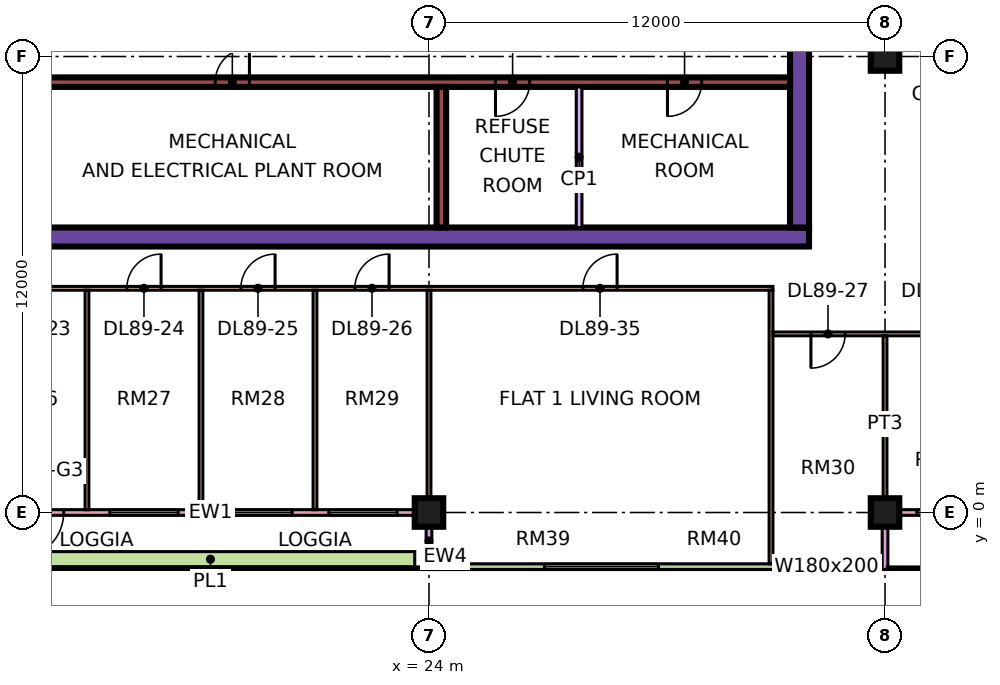
"""IFC4 building model, lengths in metres.
Left out: names, types, materials, properties, quantities, classifications, styles, units other than length and angle.
Written with IfcOpenShell. Run it as: python <this file> out.ifc"""

import sys

from ifc_helpers import new_model, si_unit, direction, frame, frame_2d, origin, origin_2d, place, context, subcontext, project, spatial, rectangle, extrude, element, fill, save


model = new_model("IFC4")
c1 = context("Model", 3, precision=1e-05, world=origin(), true_north=direction((0.0, 1.0)))
c2 = subcontext(c1, "Body", "Model", "MODEL_VIEW")
j1 = project(units=[si_unit("LENGTHUNIT", "METRE"), si_unit("PLANEANGLEUNIT", "RADIAN")], contexts=[c1])
p1 = place(None, origin())
s1 = spatial("IfcSite", under=j1, at=p1, CompositionType="ELEMENT")
p2 = place(p1, origin())
s2 = spatial("IfcBuilding", under=s1, at=p2, CompositionType="ELEMENT")
p3 = place(p2, frame((0.0, 0.0, 380.15)))
s3 = spatial("IfcBuildingStorey", under=s2, at=p3, CompositionType="ELEMENT", Elevation=380.15)
for number, where, z_axis, x_axis in (
    (1, (24.0, 0.0, 0.0), (0.0, 0.0, 1.0), (1.0, 0.0, 0.0)),
    (2, (36.0, 0.0, 0.0), (0.0, 0.0, 1.0), (1.0, 0.0, 0.0)),
    (3, (36.0, 12.0, 0.0), (0.0, 0.0, 1.0), (1.0, 0.0, 0.0)),
):
    element("IfcColumn", number, at=place(p3, frame(where, z_axis=z_axis, x_axis=x_axis)), inside=s3, PredefinedType="COLUMN", context=c2, shape_type="SweptSolid", body=[
        extrude(rectangle(XDim=0.75, YDim=0.75, at=origin_2d()), origin(), (0.0, 0.0, 1.0), 3.75),
    ])
p4 = place(p3, frame((9.0, 7.25, 0.0), z_axis=(0.0, 0.0, 1.0), x_axis=(1.0, 0.0, 0.0)))
e4 = element("IfcWall", 4, at=p4, inside=s3, PredefinedType="SHEAR", context=c2, shape_type="SweptSolid", body=[
    extrude(rectangle(XDim=25.0, YDim=0.5, at=frame_2d((12.5, 0.0))), origin(), (0.0, 0.0, 1.0), 3.75),
])
p5 = place(p3, frame((33.75, 7.5, 0.0), z_axis=(0.0, 0.0, 1.0), x_axis=(0.0, 1.0, 0.0)))
e5 = element("IfcWall", 5, at=p5, inside=s3, PredefinedType="SHEAR", context=c2, shape_type="SweptSolid", body=[
    extrude(rectangle(XDim=12.0, YDim=0.5, at=frame_2d((6.0, 0.0))), origin(), (0.0, 0.0, 1.0), 3.75),
])
p6 = place(p5, frame((5.7, 0.0, 0.0)))
e6 = element("IfcOpeningElement", 6, at=p6, cuts=e5, PredefinedType="OPENING", context=c2, shape_type="SweptSolid", body=[
    extrude(rectangle(XDim=1.8, YDim=2.4, at=frame_2d((0.9, 1.2))), frame((0.0, 0.26, 0.0), z_axis=(0.0, -1.0, 0.0), x_axis=(1.0, 0.0, 0.0)), (0.0, 0.0, 1.0), 0.52),
])
p7 = place(p3, frame((13.45, 11.325, 0.0), z_axis=(0.0, 0.0, 1.0), x_axis=(1.0, 0.0, 0.0)))
e7 = element("IfcWall", 7, at=p7, inside=s3, PredefinedType="SHEAR", context=c2, shape_type="SweptSolid", body=[
    extrude(rectangle(XDim=20.05, YDim=0.25, at=frame_2d((10.025, 0.0))), origin(), (0.0, 0.0, 1.0), 3.75),
])
p8 = place(p7, frame((4.925, 0.0, 0.0)))
e8 = element("IfcOpeningElement", 8, at=p8, cuts=e7, PredefinedType="OPENING", context=c2, shape_type="SweptSolid", body=[
    extrude(rectangle(XDim=0.9, YDim=2.1, at=frame_2d((0.45, 1.05))), frame((0.0, 0.135, 0.0), z_axis=(0.0, -1.0, 0.0), x_axis=(1.0, 0.0, 0.0)), (0.0, 0.0, 1.0), 0.27),
])
p9 = place(p7, frame((12.3, 0.0, 0.0)))
e9 = element("IfcOpeningElement", 9, at=p9, cuts=e7, PredefinedType="OPENING", context=c2, shape_type="SweptSolid", body=[
    extrude(rectangle(XDim=0.9, YDim=2.1, at=frame_2d((0.45, 1.05))), frame((0.0, 0.135, 0.0), z_axis=(0.0, -1.0, 0.0), x_axis=(1.0, 0.0, 0.0)), (0.0, 0.0, 1.0), 0.27),
])
p10 = place(p7, frame((16.825, 0.0, 0.0)))
e10 = element("IfcOpeningElement", 10, at=p10, cuts=e7, PredefinedType="OPENING", context=c2, shape_type="SweptSolid", body=[
    extrude(rectangle(XDim=0.9, YDim=2.1, at=frame_2d((0.45, 1.05))), frame((0.0, 0.135, 0.0), z_axis=(0.0, -1.0, 0.0), x_axis=(1.0, 0.0, 0.0)), (0.0, 0.0, 1.0), 0.27),
])
p11 = place(p3, frame((24.325, 7.5, 0.0), z_axis=(0.0, 0.0, 1.0), x_axis=(0.0, 1.0, 0.0)))
e11 = element("IfcWall", 11, at=p11, inside=s3, PredefinedType="SHEAR", context=c2, shape_type="SweptSolid", body=[
    extrude(rectangle(XDim=3.7, YDim=0.25, at=frame_2d((1.85, 0.0))), origin(), (0.0, 0.0, 1.0), 3.75),
])
p12 = place(p3, frame((12.575, 0.0, 0.0), z_axis=(0.0, 0.0, 1.0), x_axis=(1.0, 0.0, 0.0)))
e12 = element("IfcWall", 12, at=p12, inside=s3, PredefinedType="SOLIDWALL", context=c2, shape_type="SweptSolid", body=[
    extrude(rectangle(XDim=11.35, YDim=0.15, at=frame_2d((5.675, 0.0))), origin(), (0.0, 0.0, 1.0), 3.3),
])
p13 = place(p12, frame((0.613, 0.0, 0.0)))
e13 = element("IfcOpeningElement", 13, at=p13, cuts=e12, PredefinedType="OPENING", context=c2, shape_type="SweptSolid", body=[
    extrude(rectangle(XDim=1.2, YDim=2.4, at=frame_2d((0.6, 1.2))), frame((0.0, 0.085, 0.0), z_axis=(0.0, -1.0, 0.0), x_axis=(1.0, 0.0, 0.0)), (0.0, 0.0, 1.0), 0.17),
])
p14 = place(p12, frame((3.025, 0.0, 0.45)))
e14 = element("IfcOpeningElement", 14, at=p14, cuts=e12, PredefinedType="OPENING", context=c2, shape_type="SweptSolid", body=[
    extrude(rectangle(XDim=1.8, YDim=2.0, at=frame_2d((0.9, 1.0))), frame((0.0, 0.085, 0.0), z_axis=(0.0, -1.0, 0.0), x_axis=(1.0, 0.0, 0.0)), (0.0, 0.0, 1.0), 0.17),
])
p15 = place(p12, frame((6.025, 0.0, 0.45)))
e15 = element("IfcOpeningElement", 15, at=p15, cuts=e12, PredefinedType="OPENING", context=c2, shape_type="SweptSolid", body=[
    extrude(rectangle(XDim=1.8, YDim=2.0, at=frame_2d((0.9, 1.0))), frame((0.0, 0.085, 0.0), z_axis=(0.0, -1.0, 0.0), x_axis=(1.0, 0.0, 0.0)), (0.0, 0.0, 1.0), 0.17),
])
p16 = place(p12, frame((8.788, 0.0, 0.45)))
e16 = element("IfcOpeningElement", 16, at=p16, cuts=e12, PredefinedType="OPENING", context=c2, shape_type="SweptSolid", body=[
    extrude(rectangle(XDim=1.8, YDim=2.0, at=frame_2d((0.9, 1.0))), frame((0.0, 0.085, 0.0), z_axis=(0.0, -1.0, 0.0), x_axis=(1.0, 0.0, 0.0)), (0.0, 0.0, 1.0), 0.17),
])
p17 = place(p3, frame((24.0, -1.5, 0.0), z_axis=(0.0, 0.0, 1.0), x_axis=(0.0, 1.0, 0.0)))
e17 = element("IfcWall", 17, at=p17, inside=s3, PredefinedType="SOLIDWALL", context=c2, shape_type="SweptSolid", body=[
    extrude(rectangle(XDim=1.5, YDim=0.15, at=frame_2d((0.75, 0.0))), origin(), (0.0, 0.0, 1.0), 3.3),
])
p18 = place(p3, frame((24.075, -1.425, 0.0), z_axis=(0.0, 0.0, 1.0), x_axis=(1.0, 0.0, 0.0)))
e18 = element("IfcWall", 18, at=p18, inside=s3, PredefinedType="SOLIDWALL", context=c2, shape_type="SweptSolid", body=[
    extrude(rectangle(XDim=11.85, YDim=0.15, at=frame_2d((5.925, 0.0))), origin(), (0.0, 0.0, 1.0), 3.3),
])
p19 = place(p18, frame((2.962, 0.0, 0.45)))
e19 = element("IfcOpeningElement", 19, at=p19, cuts=e18, PredefinedType="OPENING", context=c2, shape_type="SweptSolid", body=[
    extrude(rectangle(XDim=3.0, YDim=2.0, at=frame_2d((1.5, 1.0))), frame((0.0, 0.085, 0.0), z_axis=(0.0, -1.0, 0.0), x_axis=(1.0, 0.0, 0.0)), (0.0, 0.0, 1.0), 0.17),
])
p20 = place(p18, frame((9.488, 0.0, 0.45)))
e20 = element("IfcOpeningElement", 20, at=p20, cuts=e18, PredefinedType="OPENING", context=c2, shape_type="SweptSolid", body=[
    extrude(rectangle(XDim=1.8, YDim=2.0, at=frame_2d((0.9, 1.0))), frame((0.0, 0.085, 0.0), z_axis=(0.0, -1.0, 0.0), x_axis=(1.0, 0.0, 0.0)), (0.0, 0.0, 1.0), 0.17),
])
p21 = place(p3, frame((36.075, 0.0, 0.0), z_axis=(0.0, 0.0, 1.0), x_axis=(1.0, 0.0, 0.0)))
e21 = element("IfcWall", 21, at=p21, inside=s3, PredefinedType="SOLIDWALL", context=c2, shape_type="SweptSolid", body=[
    extrude(rectangle(XDim=11.85, YDim=0.15, at=frame_2d((5.925, 0.0))), origin(), (0.0, 0.0, 1.0), 3.3),
])
p22 = place(p21, frame((0.762, 0.0, 0.45)))
e22 = element("IfcOpeningElement", 22, at=p22, cuts=e21, PredefinedType="OPENING", context=c2, shape_type="SweptSolid", body=[
    extrude(rectangle(XDim=1.8, YDim=2.0, at=frame_2d((0.9, 1.0))), frame((0.0, 0.085, 0.0), z_axis=(0.0, -1.0, 0.0), x_axis=(1.0, 0.0, 0.0)), (0.0, 0.0, 1.0), 0.17),
])
p23 = place(p21, frame((4.788, 0.0, 0.0)))
e23 = element("IfcOpeningElement", 23, at=p23, cuts=e21, PredefinedType="OPENING", context=c2, shape_type="SweptSolid", body=[
    extrude(rectangle(XDim=1.8, YDim=2.4, at=frame_2d((0.9, 1.2))), frame((0.0, 0.085, 0.0), z_axis=(0.0, -1.0, 0.0), x_axis=(1.0, 0.0, 0.0)), (0.0, 0.0, 1.0), 0.17),
])
p24 = place(p21, frame((10.025, 0.0, 0.45)))
e24 = element("IfcOpeningElement", 24, at=p24, cuts=e21, PredefinedType="OPENING", context=c2, shape_type="SweptSolid", body=[
    extrude(rectangle(XDim=1.2, YDim=2.0, at=frame_2d((0.6, 1.0))), frame((0.0, 0.085, 0.0), z_axis=(0.0, -1.0, 0.0), x_axis=(1.0, 0.0, 0.0)), (0.0, 0.0, 1.0), 0.17),
])
p25 = place(p3, frame((36.0, -1.5, 0.0), z_axis=(0.0, 0.0, 1.0), x_axis=(0.0, 1.0, 0.0)))
e25 = element("IfcWall", 25, at=p25, inside=s3, PredefinedType="SOLIDWALL", context=c2, shape_type="SweptSolid", body=[
    extrude(rectangle(XDim=1.5, YDim=0.15, at=frame_2d((0.75, 0.0))), origin(), (0.0, 0.0, 1.0), 3.3),
])
p26 = place(p3, frame((12.875, -1.229, 0.0), z_axis=(0.0, 0.0, 1.0), x_axis=(1.0, 0.0, 0.0)))
e26 = element("IfcWall", 26, at=p26, inside=s3, PredefinedType="SOLIDWALL", context=c2, shape_type="SweptSolid", body=[
    extrude(rectangle(XDim=10.75, YDim=0.4, at=frame_2d((5.375, 0.0))), origin(), (0.0, 0.0, 1.0), 0.7),
])
p27 = place(p3, frame((27.95, 7.5, 0.0), z_axis=(0.0, 0.0, 1.0), x_axis=(0.0, 1.0, 0.0)))
e27 = element("IfcWall", 27, at=p27, inside=s3, PredefinedType="PARTITIONING", context=c2, shape_type="SweptSolid", body=[
    extrude(rectangle(XDim=3.7, YDim=0.15, at=frame_2d((1.85, 0.0))), origin(), (0.0, 0.0, 1.0), 3.3),
])
p28 = place(p3, frame((11.95, 5.9, 0.0), z_axis=(0.0, 0.0, 1.0), x_axis=(1.0, 0.0, 0.0)))
e28 = element("IfcWall", 28, at=p28, inside=s3, PredefinedType="PARTITIONING", context=c2, shape_type="SweptSolid", body=[
    extrude(rectangle(XDim=21.1, YDim=0.1, at=frame_2d((10.55, 0.0))), origin(), (0.0, 0.0, 1.0), 3.3),
])
p29 = place(p28, frame((1.1, 0.0, 0.0)))
e29 = element("IfcOpeningElement", 29, at=p29, cuts=e28, PredefinedType="OPENING", context=c2, shape_type="SweptSolid", body=[
    extrude(rectangle(XDim=0.9, YDim=2.1, at=frame_2d((0.45, 1.05))), frame((0.0, 0.06, 0.0), z_axis=(0.0, -1.0, 0.0), x_axis=(1.0, 0.0, 0.0)), (0.0, 0.0, 1.0), 0.12),
])
p30 = place(p28, frame((4.1, 0.0, 0.0)))
e30 = element("IfcOpeningElement", 30, at=p30, cuts=e28, PredefinedType="OPENING", context=c2, shape_type="SweptSolid", body=[
    extrude(rectangle(XDim=0.9, YDim=2.1, at=frame_2d((0.45, 1.05))), frame((0.0, 0.06, 0.0), z_axis=(0.0, -1.0, 0.0), x_axis=(1.0, 0.0, 0.0)), (0.0, 0.0, 1.0), 0.12),
])
p31 = place(p28, frame((7.1, 0.0, 0.0)))
e31 = element("IfcOpeningElement", 31, at=p31, cuts=e28, PredefinedType="OPENING", context=c2, shape_type="SweptSolid", body=[
    extrude(rectangle(XDim=0.9, YDim=2.1, at=frame_2d((0.45, 1.05))), frame((0.0, 0.06, 0.0), z_axis=(0.0, -1.0, 0.0), x_axis=(1.0, 0.0, 0.0)), (0.0, 0.0, 1.0), 0.12),
])
p32 = place(p28, frame((10.1, 0.0, 0.0)))
e32 = element("IfcOpeningElement", 32, at=p32, cuts=e28, PredefinedType="OPENING", context=c2, shape_type="SweptSolid", body=[
    extrude(rectangle(XDim=0.9, YDim=2.1, at=frame_2d((0.45, 1.05))), frame((0.0, 0.06, 0.0), z_axis=(0.0, -1.0, 0.0), x_axis=(1.0, 0.0, 0.0)), (0.0, 0.0, 1.0), 0.12),
])
p33 = place(p28, frame((16.1, 0.0, 0.0)))
e33 = element("IfcOpeningElement", 33, at=p33, cuts=e28, PredefinedType="OPENING", context=c2, shape_type="SweptSolid", body=[
    extrude(rectangle(XDim=0.9, YDim=2.1, at=frame_2d((0.45, 1.05))), frame((0.0, 0.06, 0.0), z_axis=(0.0, -1.0, 0.0), x_axis=(1.0, 0.0, 0.0)), (0.0, 0.0, 1.0), 0.12),
])
for number, where, z_axis, x_axis in (
    (34, (15.0, 0.074, 0.0), (0.0, 0.0, 1.0), (0.0, 1.0, 0.0)),
    (35, (18.0, 0.074, 0.0), (0.0, 0.0, 1.0), (0.0, 1.0, 0.0)),
    (36, (21.0, 0.074, 0.0), (0.0, 0.0, 1.0), (0.0, 1.0, 0.0)),
):
    element("IfcWall", number, at=place(p3, frame(where, z_axis=z_axis, x_axis=x_axis)), inside=s3, PredefinedType="PARTITIONING", context=c2, shape_type="SweptSolid", body=[
        extrude(rectangle(XDim=5.776, YDim=0.1, at=frame_2d((2.888, 0.0))), origin(), (0.0, 0.0, 1.0), 3.3),
    ])
p34 = place(p3, frame((24.0, 0.0, 0.0), z_axis=(0.0, 0.0, 1.0), x_axis=(0.0, 1.0, 0.0)))
e37 = element("IfcWall", 37, at=p34, inside=s3, PredefinedType="PARTITIONING", context=c2, shape_type="SweptSolid", body=[
    extrude(rectangle(XDim=5.85, YDim=0.1, at=frame_2d((2.925, 0.0))), origin(), (0.0, 0.0, 1.0), 3.3),
])
p35 = place(p3, frame((33.0, -1.35, 0.0), z_axis=(0.0, 0.0, 1.0), x_axis=(0.0, 1.0, 0.0)))
e38 = element("IfcWall", 38, at=p35, inside=s3, PredefinedType="PARTITIONING", context=c2, shape_type="SweptSolid", body=[
    extrude(rectangle(XDim=7.2, YDim=0.1, at=frame_2d((3.6, 0.0))), origin(), (0.0, 0.0, 1.0), 3.3),
])
p36 = place(p3, frame((33.05, 4.7, 0.0), z_axis=(0.0, 0.0, 1.0), x_axis=(1.0, 0.0, 0.0)))
e39 = element("IfcWall", 39, at=p36, inside=s3, PredefinedType="PARTITIONING", context=c2, shape_type="SweptSolid", body=[
    extrude(rectangle(XDim=22.301, YDim=0.1, at=frame_2d((11.15, 0.0))), origin(), (0.0, 0.0, 1.0), 3.3),
])
p37 = place(p36, frame((1.0, 0.0, 0.0)))
e40 = element("IfcOpeningElement", 40, at=p37, cuts=e39, PredefinedType="OPENING", context=c2, shape_type="SweptSolid", body=[
    extrude(rectangle(XDim=0.9, YDim=2.1, at=frame_2d((0.45, 1.05))), frame((0.0, 0.06, 0.0), z_axis=(0.0, -1.0, 0.0), x_axis=(1.0, 0.0, 0.0)), (0.0, 0.0, 1.0), 0.12),
])
p38 = place(p36, frame((4.0, 0.0, 0.0)))
e41 = element("IfcOpeningElement", 41, at=p38, cuts=e39, PredefinedType="OPENING", context=c2, shape_type="SweptSolid", body=[
    extrude(rectangle(XDim=0.9, YDim=2.1, at=frame_2d((0.45, 1.05))), frame((0.0, 0.06, 0.0), z_axis=(0.0, -1.0, 0.0), x_axis=(1.0, 0.0, 0.0)), (0.0, 0.0, 1.0), 0.12),
])
p39 = place(p36, frame((16.0, 0.0, 0.0)))
e42 = element("IfcOpeningElement", 42, at=p39, cuts=e39, PredefinedType="OPENING", context=c2, shape_type="SweptSolid", body=[
    extrude(rectangle(XDim=0.9, YDim=2.1, at=frame_2d((0.45, 1.05))), frame((0.0, 0.06, 0.0), z_axis=(0.0, -1.0, 0.0), x_axis=(1.0, 0.0, 0.0)), (0.0, 0.0, 1.0), 0.12),
])
p40 = place(p36, frame((19.0, 0.0, 0.0)))
e43 = element("IfcOpeningElement", 43, at=p40, cuts=e39, PredefinedType="OPENING", context=c2, shape_type="SweptSolid", body=[
    extrude(rectangle(XDim=0.9, YDim=2.1, at=frame_2d((0.45, 1.05))), frame((0.0, 0.06, 0.0), z_axis=(0.0, -1.0, 0.0), x_axis=(1.0, 0.0, 0.0)), (0.0, 0.0, 1.0), 0.12),
])
p41 = place(p36, frame((10.0, 0.0, 0.0)))
e44 = element("IfcOpeningElement", 44, at=p41, cuts=e39, PredefinedType="OPENING", context=c2, shape_type="SweptSolid", body=[
    extrude(rectangle(XDim=0.9, YDim=2.1, at=frame_2d((0.45, 1.05))), frame((0.0, 0.06, 0.0), z_axis=(0.0, -1.0, 0.0), x_axis=(1.0, 0.0, 0.0)), (0.0, 0.0, 1.0), 0.12),
])
p42 = place(p3, frame((36.0, 0.0, 0.0), z_axis=(0.0, 0.0, 1.0), x_axis=(0.0, 1.0, 0.0)))
e45 = element("IfcWall", 45, at=p42, inside=s3, PredefinedType="PARTITIONING", context=c2, shape_type="SweptSolid", body=[
    extrude(rectangle(XDim=4.65, YDim=0.1, at=frame_2d((2.325, 0.0))), origin(), (0.0, 0.0, 1.0), 3.3),
])
p43 = place(p13, frame((1.2, 0.0, 0.0), z_axis=(0.0, 0.0, 1.0), x_axis=(-1.0, 0.0, 0.0)))
e46 = element("IfcDoor", 46, at=p43, inside=s3, OperationType="DOUBLE_DOOR_SINGLE_SWING", PredefinedType="DOOR", context=c2, shape_type="SweptSolid", body=[
    extrude(rectangle(XDim=1.2, YDim=2.4, at=frame_2d((0.6, 1.2))), frame((0.0, 0.025, 0.0), z_axis=(0.0, -1.0, 0.0), x_axis=(1.0, 0.0, 0.0)), (0.0, 0.0, 1.0), 0.05),
])
fill(e13, e46)
p44 = place(p14, origin())
e47 = element("IfcWindow", 47, at=p44, inside=s3, PartitioningType="SINGLE_PANEL", PredefinedType="WINDOW", context=c2, shape_type="SweptSolid", body=[
    extrude(rectangle(XDim=1.8, YDim=2.0, at=frame_2d((0.9, 1.0))), frame((0.0, 0.03, 0.0), z_axis=(0.0, -1.0, 0.0), x_axis=(1.0, 0.0, 0.0)), (0.0, 0.0, 1.0), 0.06),
])
fill(e14, e47)
p45 = place(p15, origin())
e48 = element("IfcWindow", 48, at=p45, inside=s3, PartitioningType="SINGLE_PANEL", PredefinedType="WINDOW", context=c2, shape_type="SweptSolid", body=[
    extrude(rectangle(XDim=1.8, YDim=2.0, at=frame_2d((0.9, 1.0))), frame((0.0, 0.03, 0.0), z_axis=(0.0, -1.0, 0.0), x_axis=(1.0, 0.0, 0.0)), (0.0, 0.0, 1.0), 0.06),
])
fill(e15, e48)
p46 = place(p16, origin())
e49 = element("IfcWindow", 49, at=p46, inside=s3, PartitioningType="SINGLE_PANEL", PredefinedType="WINDOW", context=c2, shape_type="SweptSolid", body=[
    extrude(rectangle(XDim=1.8, YDim=2.0, at=frame_2d((0.9, 1.0))), frame((0.0, 0.03, 0.0), z_axis=(0.0, -1.0, 0.0), x_axis=(1.0, 0.0, 0.0)), (0.0, 0.0, 1.0), 0.06),
])
fill(e16, e49)
p47 = place(p19, origin())
e50 = element("IfcWindow", 50, at=p47, inside=s3, PartitioningType="SINGLE_PANEL", PredefinedType="WINDOW", context=c2, shape_type="SweptSolid", body=[
    extrude(rectangle(XDim=3.0, YDim=2.0, at=frame_2d((1.5, 1.0))), frame((0.0, 0.03, 0.0), z_axis=(0.0, -1.0, 0.0), x_axis=(1.0, 0.0, 0.0)), (0.0, 0.0, 1.0), 0.06),
])
fill(e19, e50)
p48 = place(p20, origin())
e51 = element("IfcWindow", 51, at=p48, inside=s3, PartitioningType="SINGLE_PANEL", PredefinedType="WINDOW", context=c2, shape_type="SweptSolid", body=[
    extrude(rectangle(XDim=1.8, YDim=2.0, at=frame_2d((0.9, 1.0))), frame((0.0, 0.03, 0.0), z_axis=(0.0, -1.0, 0.0), x_axis=(1.0, 0.0, 0.0)), (0.0, 0.0, 1.0), 0.06),
])
fill(e20, e51)
p49 = place(p22, origin())
e52 = element("IfcWindow", 52, at=p49, inside=s3, PartitioningType="SINGLE_PANEL", PredefinedType="WINDOW", context=c2, shape_type="SweptSolid", body=[
    extrude(rectangle(XDim=1.8, YDim=2.0, at=frame_2d((0.9, 1.0))), frame((0.0, 0.03, 0.0), z_axis=(0.0, -1.0, 0.0), x_axis=(1.0, 0.0, 0.0)), (0.0, 0.0, 1.0), 0.06),
])
fill(e22, e52)
p50 = place(p8, frame((0.9, 0.0, 0.0), z_axis=(0.0, 0.0, 1.0), x_axis=(-1.0, 0.0, 0.0)))
e53 = element("IfcDoor", 53, at=p50, inside=s3, OperationType="SINGLE_SWING_RIGHT", PredefinedType="DOOR", context=c2, shape_type="SweptSolid", body=[
    extrude(rectangle(XDim=0.9, YDim=2.1, at=frame_2d((0.45, 1.05))), frame((0.0, 0.025, 0.0), z_axis=(0.0, -1.0, 0.0), x_axis=(1.0, 0.0, 0.0)), (0.0, 0.0, 1.0), 0.05),
])
fill(e8, e53)
p51 = place(p9, frame((0.9, 0.0, 0.0), z_axis=(0.0, 0.0, 1.0), x_axis=(-1.0, 0.0, 0.0)))
e54 = element("IfcDoor", 54, at=p51, inside=s3, OperationType="SINGLE_SWING_LEFT", PredefinedType="DOOR", context=c2, shape_type="SweptSolid", body=[
    extrude(rectangle(XDim=0.9, YDim=2.1, at=frame_2d((0.45, 1.05))), frame((0.0, 0.025, 0.0), z_axis=(0.0, -1.0, 0.0), x_axis=(1.0, 0.0, 0.0)), (0.0, 0.0, 1.0), 0.05),
])
fill(e9, e54)
p52 = place(p10, frame((0.9, 0.0, 0.0), z_axis=(0.0, 0.0, 1.0), x_axis=(-1.0, 0.0, 0.0)))
e55 = element("IfcDoor", 55, at=p52, inside=s3, OperationType="SINGLE_SWING_LEFT", PredefinedType="DOOR", context=c2, shape_type="SweptSolid", body=[
    extrude(rectangle(XDim=0.9, YDim=2.1, at=frame_2d((0.45, 1.05))), frame((0.0, 0.025, 0.0), z_axis=(0.0, -1.0, 0.0), x_axis=(1.0, 0.0, 0.0)), (0.0, 0.0, 1.0), 0.05),
])
fill(e10, e55)
p53 = place(p30, frame((0.9, 0.0, 0.0), z_axis=(0.0, 0.0, 1.0), x_axis=(-1.0, 0.0, 0.0)))
e56 = element("IfcDoor", 56, at=p53, inside=s3, OperationType="SINGLE_SWING_RIGHT", PredefinedType="DOOR", context=c2, shape_type="SweptSolid", body=[
    extrude(rectangle(XDim=0.9, YDim=2.1, at=frame_2d((0.45, 1.05))), frame((0.0, 0.025, 0.0), z_axis=(0.0, -1.0, 0.0), x_axis=(1.0, 0.0, 0.0)), (0.0, 0.0, 1.0), 0.05),
])
fill(e30, e56)
p54 = place(p31, frame((0.9, 0.0, 0.0), z_axis=(0.0, 0.0, 1.0), x_axis=(-1.0, 0.0, 0.0)))
e57 = element("IfcDoor", 57, at=p54, inside=s3, OperationType="SINGLE_SWING_RIGHT", PredefinedType="DOOR", context=c2, shape_type="SweptSolid", body=[
    extrude(rectangle(XDim=0.9, YDim=2.1, at=frame_2d((0.45, 1.05))), frame((0.0, 0.025, 0.0), z_axis=(0.0, -1.0, 0.0), x_axis=(1.0, 0.0, 0.0)), (0.0, 0.0, 1.0), 0.05),
])
fill(e31, e57)
p55 = place(p32, frame((0.9, 0.0, 0.0), z_axis=(0.0, 0.0, 1.0), x_axis=(-1.0, 0.0, 0.0)))
e58 = element("IfcDoor", 58, at=p55, inside=s3, OperationType="SINGLE_SWING_RIGHT", PredefinedType="DOOR", context=c2, shape_type="SweptSolid", body=[
    extrude(rectangle(XDim=0.9, YDim=2.1, at=frame_2d((0.45, 1.05))), frame((0.0, 0.025, 0.0), z_axis=(0.0, -1.0, 0.0), x_axis=(1.0, 0.0, 0.0)), (0.0, 0.0, 1.0), 0.05),
])
fill(e32, e58)
p56 = place(p37, frame((0.9, 0.0, 0.0), z_axis=(0.0, 0.0, 1.0), x_axis=(-1.0, 0.0, 0.0)))
e59 = element("IfcDoor", 59, at=p56, inside=s3, OperationType="SINGLE_SWING_LEFT", PredefinedType="DOOR", context=c2, shape_type="SweptSolid", body=[
    extrude(rectangle(XDim=0.9, YDim=2.1, at=frame_2d((0.45, 1.05))), frame((0.0, 0.025, 0.0), z_axis=(0.0, -1.0, 0.0), x_axis=(1.0, 0.0, 0.0)), (0.0, 0.0, 1.0), 0.05),
])
fill(e40, e59)
p57 = place(p33, frame((0.9, 0.0, 0.0), z_axis=(0.0, 0.0, 1.0), x_axis=(-1.0, 0.0, 0.0)))
e60 = element("IfcDoor", 60, at=p57, inside=s3, OperationType="SINGLE_SWING_RIGHT", PredefinedType="DOOR", context=c2, shape_type="SweptSolid", body=[
    extrude(rectangle(XDim=0.9, YDim=2.1, at=frame_2d((0.45, 1.05))), frame((0.0, 0.025, 0.0), z_axis=(0.0, -1.0, 0.0), x_axis=(1.0, 0.0, 0.0)), (0.0, 0.0, 1.0), 0.05),
])
fill(e33, e60)
save(model, sys.argv[1])
